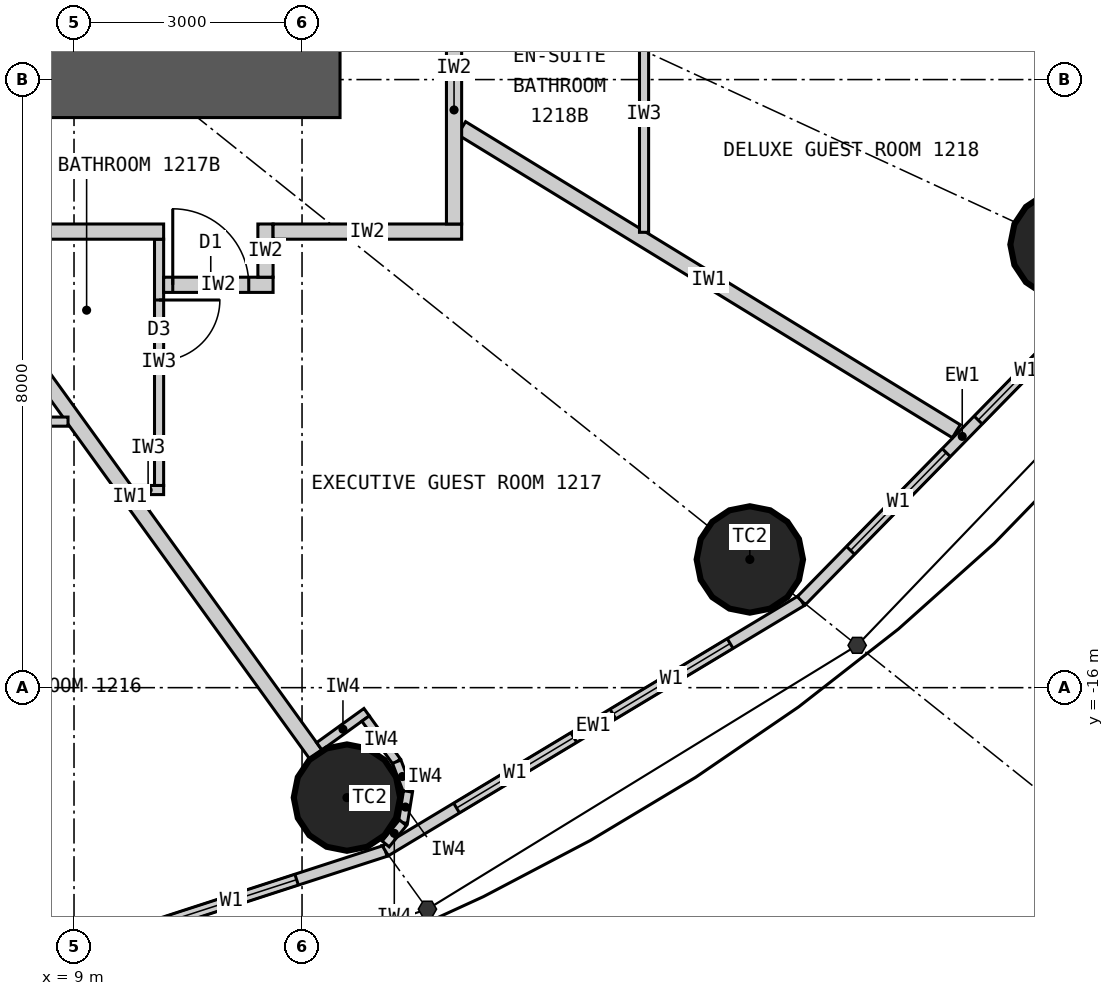
"""IFC4 building model, lengths in metres.
Left out: names, types, materials, properties, quantities, classifications, styles, units other than length and angle.
Written with IfcOpenShell. Run it as: python <this file> out.ifc"""

import sys

from ifc_helpers import new_model, si_unit, direction, frame, frame_2d, origin, origin_2d, place, context, subcontext, project, spatial, rectangle, circle, extrude, element, fill, save


model = new_model("IFC4")
c1 = context("Model", 3, precision=1e-05, world=origin(), true_north=direction((0.0, 1.0)))
c2 = subcontext(c1, "Body", "Model", "MODEL_VIEW")
j1 = project(units=[si_unit("LENGTHUNIT", "METRE"), si_unit("PLANEANGLEUNIT", "RADIAN")], contexts=[c1])
p1 = place(None, origin())
s1 = spatial("IfcSite", under=j1, at=p1, CompositionType="ELEMENT")
p2 = place(p1, origin())
s2 = spatial("IfcBuilding", under=s1, at=p2, CompositionType="ELEMENT")
p3 = place(p2, frame((0.0, 0.0, 54.0)))
s3 = spatial("IfcBuildingStorey", under=s2, at=p3, CompositionType="ELEMENT", Elevation=54.0)
for number, where, z_axis, x_axis in (
    (1, (12.591, -17.447, 0.0), (0.0, 0.0, 1.0), (1.0, 0.0, 0.0)),
    (2, (17.892, -14.313, 0.0), (0.0, 0.0, 1.0), (1.0, 0.0, 0.0)),
    (3, (22.019, -10.17, 0.0), (0.0, 0.0, 1.0), (1.0, 0.0, 0.0)),
):
    element("IfcColumn", number, at=place(p3, frame(where, z_axis=z_axis, x_axis=x_axis)), inside=s3, PredefinedType="COLUMN", context=c2, shape_type="SweptSolid", body=[
        extrude(circle(Radius=0.7, at=origin_2d()), origin(), (0.0, 0.0, 1.0), 3.3),
    ])
p4 = place(p3, frame((12.5, -8.0, 0.0), z_axis=(0.0, 0.0, 1.0), x_axis=(-1.0, 0.0, 0.0)))
e4 = element("IfcWall", 4, at=p4, inside=s3, PredefinedType="SHEAR", context=c2, shape_type="SweptSolid", body=[
    extrude(rectangle(XDim=25.0, YDim=1.0, at=frame_2d((12.5, 0.0))), origin(), (0.0, 0.0, 1.0), 3.3),
])
p5 = place(p4, frame((11.2, 0.0, 0.0)))
e5 = element("IfcOpeningElement", 5, at=p5, cuts=e4, PredefinedType="OPENING", context=c2, shape_type="SweptSolid", body=[
    extrude(rectangle(XDim=1.2, YDim=2.2, at=frame_2d((0.6, 1.1))), frame((0.0, 0.51, 0.0), z_axis=(0.0, -1.0, 0.0), x_axis=(1.0, 0.0, 0.0)), (0.0, 0.0, 1.0), 1.02),
])
p6 = place(p4, frame((18.8, 0.0, 0.0)))
e6 = element("IfcOpeningElement", 6, at=p6, cuts=e4, PredefinedType="OPENING", context=c2, shape_type="SweptSolid", body=[
    extrude(rectangle(XDim=0.9, YDim=2.2, at=frame_2d((0.45, 1.1))), frame((0.0, 0.51, 0.0), z_axis=(0.0, -1.0, 0.0), x_axis=(1.0, 0.0, 0.0)), (0.0, 0.0, 1.0), 1.02),
])
p7 = place(p3, frame((6.766, -20.202, 0.0), z_axis=(0.0, 0.0, 1.0), x_axis=(0.951137534625, 0.308767534285, 0.0)))
e7 = element("IfcWall", 7, at=p7, inside=s3, PredefinedType="ELEMENTEDWALL", context=c2, shape_type="SweptSolid", body=[
    extrude(rectangle(XDim=6.655, YDim=0.15, at=frame_2d((3.328, 0.0))), origin(), (0.0, 0.0, 1.0), 3.12),
])
p8 = place(p7, frame((1.228, 0.0, 0.9)))
e8 = element("IfcOpeningElement", 8, at=p8, cuts=e7, PredefinedType="OPENING", context=c2, shape_type="SweptSolid", body=[
    extrude(rectangle(XDim=1.8, YDim=1.9, at=frame_2d((0.9, 0.95))), frame((0.0, 0.085, 0.0), z_axis=(0.0, -1.0, 0.0), x_axis=(1.0, 0.0, 0.0)), (0.0, 0.0, 1.0), 0.17),
])
p9 = place(p7, frame((3.628, 0.0, 0.9)))
e9 = element("IfcOpeningElement", 9, at=p9, cuts=e7, PredefinedType="OPENING", context=c2, shape_type="SweptSolid", body=[
    extrude(rectangle(XDim=1.8, YDim=1.9, at=frame_2d((0.9, 0.95))), frame((0.0, 0.085, 0.0), z_axis=(0.0, -1.0, 0.0), x_axis=(1.0, 0.0, 0.0)), (0.0, 0.0, 1.0), 0.17),
])
p10 = place(p3, frame((13.096, -18.147, 0.0), z_axis=(0.0, 0.0, 1.0), x_axis=(0.856983180864, 0.515344377787, 0.0)))
e10 = element("IfcWall", 10, at=p10, inside=s3, PredefinedType="ELEMENTEDWALL", context=c2, shape_type="SweptSolid", body=[
    extrude(rectangle(XDim=6.386, YDim=0.15, at=frame_2d((3.193, 0.0))), origin(), (0.0, 0.0, 1.0), 3.12),
])
p11 = place(p10, frame((1.093, 0.0, 0.9)))
e11 = element("IfcOpeningElement", 11, at=p11, cuts=e10, PredefinedType="OPENING", context=c2, shape_type="SweptSolid", body=[
    extrude(rectangle(XDim=1.8, YDim=1.9, at=frame_2d((0.9, 0.95))), frame((0.0, 0.085, 0.0), z_axis=(0.0, -1.0, 0.0), x_axis=(1.0, 0.0, 0.0)), (0.0, 0.0, 1.0), 0.17),
])
p12 = place(p10, frame((3.493, 0.0, 0.9)))
e12 = element("IfcOpeningElement", 12, at=p12, cuts=e10, PredefinedType="OPENING", context=c2, shape_type="SweptSolid", body=[
    extrude(rectangle(XDim=1.8, YDim=1.9, at=frame_2d((0.9, 0.95))), frame((0.0, 0.085, 0.0), z_axis=(0.0, -1.0, 0.0), x_axis=(1.0, 0.0, 0.0)), (0.0, 0.0, 1.0), 0.17),
])
p13 = place(p3, frame((18.57, -14.856, 0.0), z_axis=(0.0, 0.0, 1.0), x_axis=(0.699602905915, 0.714531856557, 0.0)))
e13 = element("IfcWall", 13, at=p13, inside=s3, PredefinedType="ELEMENTEDWALL", context=c2, shape_type="SweptSolid", body=[
    extrude(rectangle(XDim=6.051, YDim=0.15, at=frame_2d((3.025, 0.0))), origin(), (0.0, 0.0, 1.0), 3.12),
])
p14 = place(p13, frame((0.926, 0.0, 0.9)))
e14 = element("IfcOpeningElement", 14, at=p14, cuts=e13, PredefinedType="OPENING", context=c2, shape_type="SweptSolid", body=[
    extrude(rectangle(XDim=1.8, YDim=1.9, at=frame_2d((0.9, 0.95))), frame((0.0, 0.085, 0.0), z_axis=(0.0, -1.0, 0.0), x_axis=(1.0, 0.0, 0.0)), (0.0, 0.0, 1.0), 0.17),
])
p15 = place(p13, frame((3.325, 0.0, 0.9)))
e15 = element("IfcOpeningElement", 15, at=p15, cuts=e13, PredefinedType="OPENING", context=c2, shape_type="SweptSolid", body=[
    extrude(rectangle(XDim=1.8, YDim=1.9, at=frame_2d((0.9, 0.95))), frame((0.0, 0.085, 0.0), z_axis=(0.0, -1.0, 0.0), x_axis=(1.0, 0.0, 0.0)), (0.0, 0.0, 1.0), 0.17),
])
p16 = place(p3, frame((7.289, -10.1, 0.0), z_axis=(0.0, 0.0, 1.0), x_axis=(0.585198353053, -0.810890182197, 0.0)))
e16 = element("IfcWall", 16, at=p16, inside=s3, PredefinedType="PARTITIONING", context=c2, shape_type="SweptSolid", body=[
    extrude(rectangle(XDim=8.36, YDim=0.2, at=frame_2d((4.18, 0.0))), origin(), (0.0, 0.0, 1.0), 2.32),
])
p17 = place(p3, frame((14.1, -8.639, 0.0), z_axis=(0.0, 0.0, 1.0), x_axis=(0.852672493023, -0.522445805459, 0.0)))
e17 = element("IfcWall", 17, at=p17, inside=s3, PredefinedType="PARTITIONING", context=c2, shape_type="SweptSolid", body=[
    extrude(rectangle(XDim=7.633, YDim=0.2, at=frame_2d((3.817, 0.0))), origin(), (0.0, 0.0, 1.0), 3.12),
])
p18 = place(p3, frame((14.1, -4.663, 0.0), z_axis=(0.0, 0.0, 1.0), x_axis=(0.949432655039, -0.31397075269, 0.0)))
e18 = element("IfcWall", 18, at=p18, inside=s3, PredefinedType="PARTITIONING", context=c2, shape_type="SweptSolid", body=[
    extrude(rectangle(XDim=10.486, YDim=0.2, at=frame_2d((5.243, 0.0))), origin(), (0.0, 0.0, 1.0), 3.12),
])
p19 = place(p3, frame((8.921, -12.5, 0.0), z_axis=(0.0, 0.0, 1.0), x_axis=(-1.0, 0.0, 0.0)))
e19 = element("IfcWall", 19, at=p19, inside=s3, PredefinedType="PARTITIONING", context=c2, shape_type="SweptSolid", body=[
    extrude(rectangle(XDim=3.372, YDim=0.12, at=frame_2d((1.686, 0.0))), origin(), (0.0, 0.0, 1.0), 3.12),
])
p20 = place(p3, frame((9.771, -13.4, 0.0), z_axis=(0.0, 0.0, 1.0), x_axis=(1.0, 0.0, 0.0)))
e20 = element("IfcWall", 20, at=p20, inside=s3, PredefinedType="PARTITIONING", context=c2, shape_type="SweptSolid", body=[
    extrude(rectangle(XDim=0.408, YDim=0.12, at=frame_2d((0.204, 0.0))), origin(), (0.0, 0.0, 1.0), 3.12),
])
p21 = place(p3, frame((10.119, -10.1, 0.0), z_axis=(0.0, 0.0, 1.0), x_axis=(0.0, -1.0, 0.0)))
e21 = element("IfcWall", 21, at=p21, inside=s3, PredefinedType="PARTITIONING", context=c2, shape_type="SweptSolid", body=[
    extrude(rectangle(XDim=3.24, YDim=0.12, at=frame_2d((1.62, 0.0))), origin(), (0.0, 0.0, 1.0), 3.12),
])
p22 = place(p21, frame((0.8, 0.0, 0.0)))
e22 = element("IfcOpeningElement", 22, at=p22, cuts=e21, PredefinedType="OPENING", context=c2, shape_type="SweptSolid", body=[
    extrude(rectangle(XDim=0.8, YDim=2.1, at=frame_2d((0.4, 1.05))), frame((0.0, 0.07, 0.0), z_axis=(0.0, -1.0, 0.0), x_axis=(1.0, 0.0, 0.0)), (0.0, 0.0, 1.0), 0.14),
])
p23 = place(p3, frame((16.5, -10.01, 0.0), z_axis=(0.0, 0.0, 1.0), x_axis=(0.0, 1.0, 0.0)))
e23 = element("IfcWall", 23, at=p23, inside=s3, PredefinedType="PARTITIONING", context=c2, shape_type="SweptSolid", body=[
    extrude(rectangle(XDim=3.111, YDim=0.12, at=frame_2d((1.555, 0.0))), origin(), (0.0, 0.0, 1.0), 3.12),
])
p24 = place(p3, frame((11.619, -10.7, 0.0), z_axis=(0.0, 0.0, 1.0), x_axis=(-1.0, 0.0, 0.0)))
e24 = element("IfcWall", 24, at=p24, inside=s3, PredefinedType="PARTITIONING", context=c2, shape_type="SweptSolid", body=[
    extrude(rectangle(XDim=1.44, YDim=0.2, at=frame_2d((0.72, 0.0))), origin(), (0.0, 0.0, 1.0), 3.12),
])
p25 = place(p24, frame((0.32, 0.0, 0.0)))
e25 = element("IfcOpeningElement", 25, at=p25, cuts=e24, PredefinedType="OPENING", context=c2, shape_type="SweptSolid", body=[
    extrude(rectangle(XDim=1.0, YDim=2.2, at=frame_2d((0.5, 1.1))), frame((0.0, 0.11, 0.0), z_axis=(0.0, -1.0, 0.0), x_axis=(1.0, 0.0, 0.0)), (0.0, 0.0, 1.0), 0.22),
])
p26 = place(p3, frame((11.519, -9.9, 0.0), z_axis=(0.0, 0.0, 1.0), x_axis=(0.0, -1.0, 0.0)))
e26 = element("IfcWall", 26, at=p26, inside=s3, PredefinedType="PARTITIONING", context=c2, shape_type="SweptSolid", body=[
    extrude(rectangle(XDim=0.7, YDim=0.2, at=frame_2d((0.35, 0.0))), origin(), (0.0, 0.0, 1.0), 3.12),
])
p27 = place(p3, frame((14.1, -10.0, 0.0), z_axis=(0.0, 0.0, 1.0), x_axis=(-1.0, 0.0, 0.0)))
e27 = element("IfcWall", 27, at=p27, inside=s3, PredefinedType="PARTITIONING", context=c2, shape_type="SweptSolid", body=[
    extrude(rectangle(XDim=2.481, YDim=0.2, at=frame_2d((1.24, 0.0))), origin(), (0.0, 0.0, 1.0), 3.12),
])
p28 = place(p3, frame((10.179, -10.0, 0.0), z_axis=(0.0, 0.0, 1.0), x_axis=(-1.0, 0.0, 0.0)))
e28 = element("IfcWall", 28, at=p28, inside=s3, PredefinedType="PARTITIONING", context=c2, shape_type="SweptSolid", body=[
    extrude(rectangle(XDim=4.63, YDim=0.2, at=frame_2d((2.315, 0.0))), origin(), (0.0, 0.0, 1.0), 3.12),
])
p29 = place(p3, frame((14.0, -9.9, 0.0), z_axis=(0.0, 0.0, 1.0), x_axis=(0.0, 1.0, 0.0)))
e29 = element("IfcWall", 29, at=p29, inside=s3, PredefinedType="PARTITIONING", context=c2, shape_type="SweptSolid", body=[
    extrude(rectangle(XDim=3.001, YDim=0.2, at=frame_2d((1.5, 0.0))), origin(), (0.0, 0.0, 1.0), 3.12),
])
p30 = place(p3, frame((12.227, -16.772, 0.0), z_axis=(0.0, 0.0, 1.0), x_axis=(0.810821798253, 0.585293098778, 0.0)))
e30 = element("IfcWall", 30, at=p30, inside=s3, PredefinedType="PARTITIONING", context=c2, shape_type="SweptSolid", body=[
    extrude(rectangle(XDim=0.768, YDim=0.12, at=frame_2d((0.384, 0.0))), origin(), (0.0, 0.0, 1.0), 3.12),
])
p31 = place(p3, frame((12.836, -16.406, 0.0), z_axis=(0.0, 0.0, 1.0), x_axis=(0.585223113993, -0.810872312296, 0.0)))
e31 = element("IfcWall", 31, at=p31, inside=s3, PredefinedType="PARTITIONING", context=c2, shape_type="SweptSolid", body=[
    extrude(rectangle(XDim=0.7, YDim=0.12, at=frame_2d((0.35, 0.0))), origin(), (0.0, 0.0, 1.0), 3.12),
])
p32 = place(p3, frame((13.246, -16.974, 0.0), z_axis=(0.0, 0.0, 1.0), x_axis=(0.355728122235, -0.934589483705, 0.0)))
e32 = element("IfcWall", 32, at=p32, inside=s3, PredefinedType="PARTITIONING", context=c2, shape_type="SweptSolid", body=[
    extrude(rectangle(XDim=0.418, YDim=0.12, at=frame_2d((0.209, 0.0))), origin(), (0.0, 0.0, 1.0), 3.12),
])
p33 = place(p3, frame((13.394, -17.365, 0.0), z_axis=(0.0, 0.0, 1.0), x_axis=(-0.159379276926, -0.987217425943, 0.0)))
e33 = element("IfcWall", 33, at=p33, inside=s3, PredefinedType="PARTITIONING", context=c2, shape_type="SweptSolid", body=[
    extrude(rectangle(XDim=0.418, YDim=0.12, at=frame_2d((0.209, 0.0))), origin(), (0.0, 0.0, 1.0), 3.12),
])
p34 = place(p3, frame((13.328, -17.777, 0.0), z_axis=(0.0, 0.0, 1.0), x_axis=(-0.632276783541, -0.774742582407, 0.0)))
e34 = element("IfcWall", 34, at=p34, inside=s3, PredefinedType="PARTITIONING", context=c2, shape_type="SweptSolid", body=[
    extrude(rectangle(XDim=0.36, YDim=0.12, at=frame_2d((0.18, 0.0))), origin(), (0.0, 0.0, 1.0), 3.12),
])
p35 = place(p9, origin())
e35 = element("IfcWindow", 35, at=p35, inside=s3, PartitioningType="SINGLE_PANEL", PredefinedType="WINDOW", context=c2, shape_type="SweptSolid", body=[
    extrude(rectangle(XDim=1.8, YDim=1.9, at=frame_2d((0.9, 0.95))), frame((0.0, 0.03, 0.0), z_axis=(0.0, -1.0, 0.0), x_axis=(1.0, 0.0, 0.0)), (0.0, 0.0, 1.0), 0.06),
])
fill(e9, e35)
p36 = place(p11, origin())
e36 = element("IfcWindow", 36, at=p36, inside=s3, PartitioningType="SINGLE_PANEL", PredefinedType="WINDOW", context=c2, shape_type="SweptSolid", body=[
    extrude(rectangle(XDim=1.8, YDim=1.9, at=frame_2d((0.9, 0.95))), frame((0.0, 0.03, 0.0), z_axis=(0.0, -1.0, 0.0), x_axis=(1.0, 0.0, 0.0)), (0.0, 0.0, 1.0), 0.06),
])
fill(e11, e36)
p37 = place(p12, origin())
e37 = element("IfcWindow", 37, at=p37, inside=s3, PartitioningType="SINGLE_PANEL", PredefinedType="WINDOW", context=c2, shape_type="SweptSolid", body=[
    extrude(rectangle(XDim=1.8, YDim=1.9, at=frame_2d((0.9, 0.95))), frame((0.0, 0.03, 0.0), z_axis=(0.0, -1.0, 0.0), x_axis=(1.0, 0.0, 0.0)), (0.0, 0.0, 1.0), 0.06),
])
fill(e12, e37)
p38 = place(p14, origin())
e38 = element("IfcWindow", 38, at=p38, inside=s3, PartitioningType="SINGLE_PANEL", PredefinedType="WINDOW", context=c2, shape_type="SweptSolid", body=[
    extrude(rectangle(XDim=1.8, YDim=1.9, at=frame_2d((0.9, 0.95))), frame((0.0, 0.03, 0.0), z_axis=(0.0, -1.0, 0.0), x_axis=(1.0, 0.0, 0.0)), (0.0, 0.0, 1.0), 0.06),
])
fill(e14, e38)
p39 = place(p15, origin())
e39 = element("IfcWindow", 39, at=p39, inside=s3, PartitioningType="SINGLE_PANEL", PredefinedType="WINDOW", context=c2, shape_type="SweptSolid", body=[
    extrude(rectangle(XDim=1.8, YDim=1.9, at=frame_2d((0.9, 0.95))), frame((0.0, 0.03, 0.0), z_axis=(0.0, -1.0, 0.0), x_axis=(1.0, 0.0, 0.0)), (0.0, 0.0, 1.0), 0.06),
])
fill(e15, e39)
p40 = place(p22, origin())
e40 = element("IfcDoor", 40, at=p40, inside=s3, OperationType="SINGLE_SWING_LEFT", PredefinedType="DOOR", context=c2, shape_type="SweptSolid", body=[
    extrude(rectangle(XDim=0.8, YDim=2.1, at=frame_2d((0.4, 1.05))), frame((0.0, 0.025, 0.0), z_axis=(0.0, -1.0, 0.0), x_axis=(1.0, 0.0, 0.0)), (0.0, 0.0, 1.0), 0.05),
])
fill(e22, e40)
p41 = place(p25, origin())
e41 = element("IfcDoor", 41, at=p41, inside=s3, OperationType="SINGLE_SWING_RIGHT", PredefinedType="DOOR", context=c2, shape_type="SweptSolid", body=[
    extrude(rectangle(XDim=1.0, YDim=2.2, at=frame_2d((0.5, 1.1))), frame((0.0, 0.025, 0.0), z_axis=(0.0, -1.0, 0.0), x_axis=(1.0, 0.0, 0.0)), (0.0, 0.0, 1.0), 0.05),
])
fill(e25, e41)
save(model, sys.argv[1])
